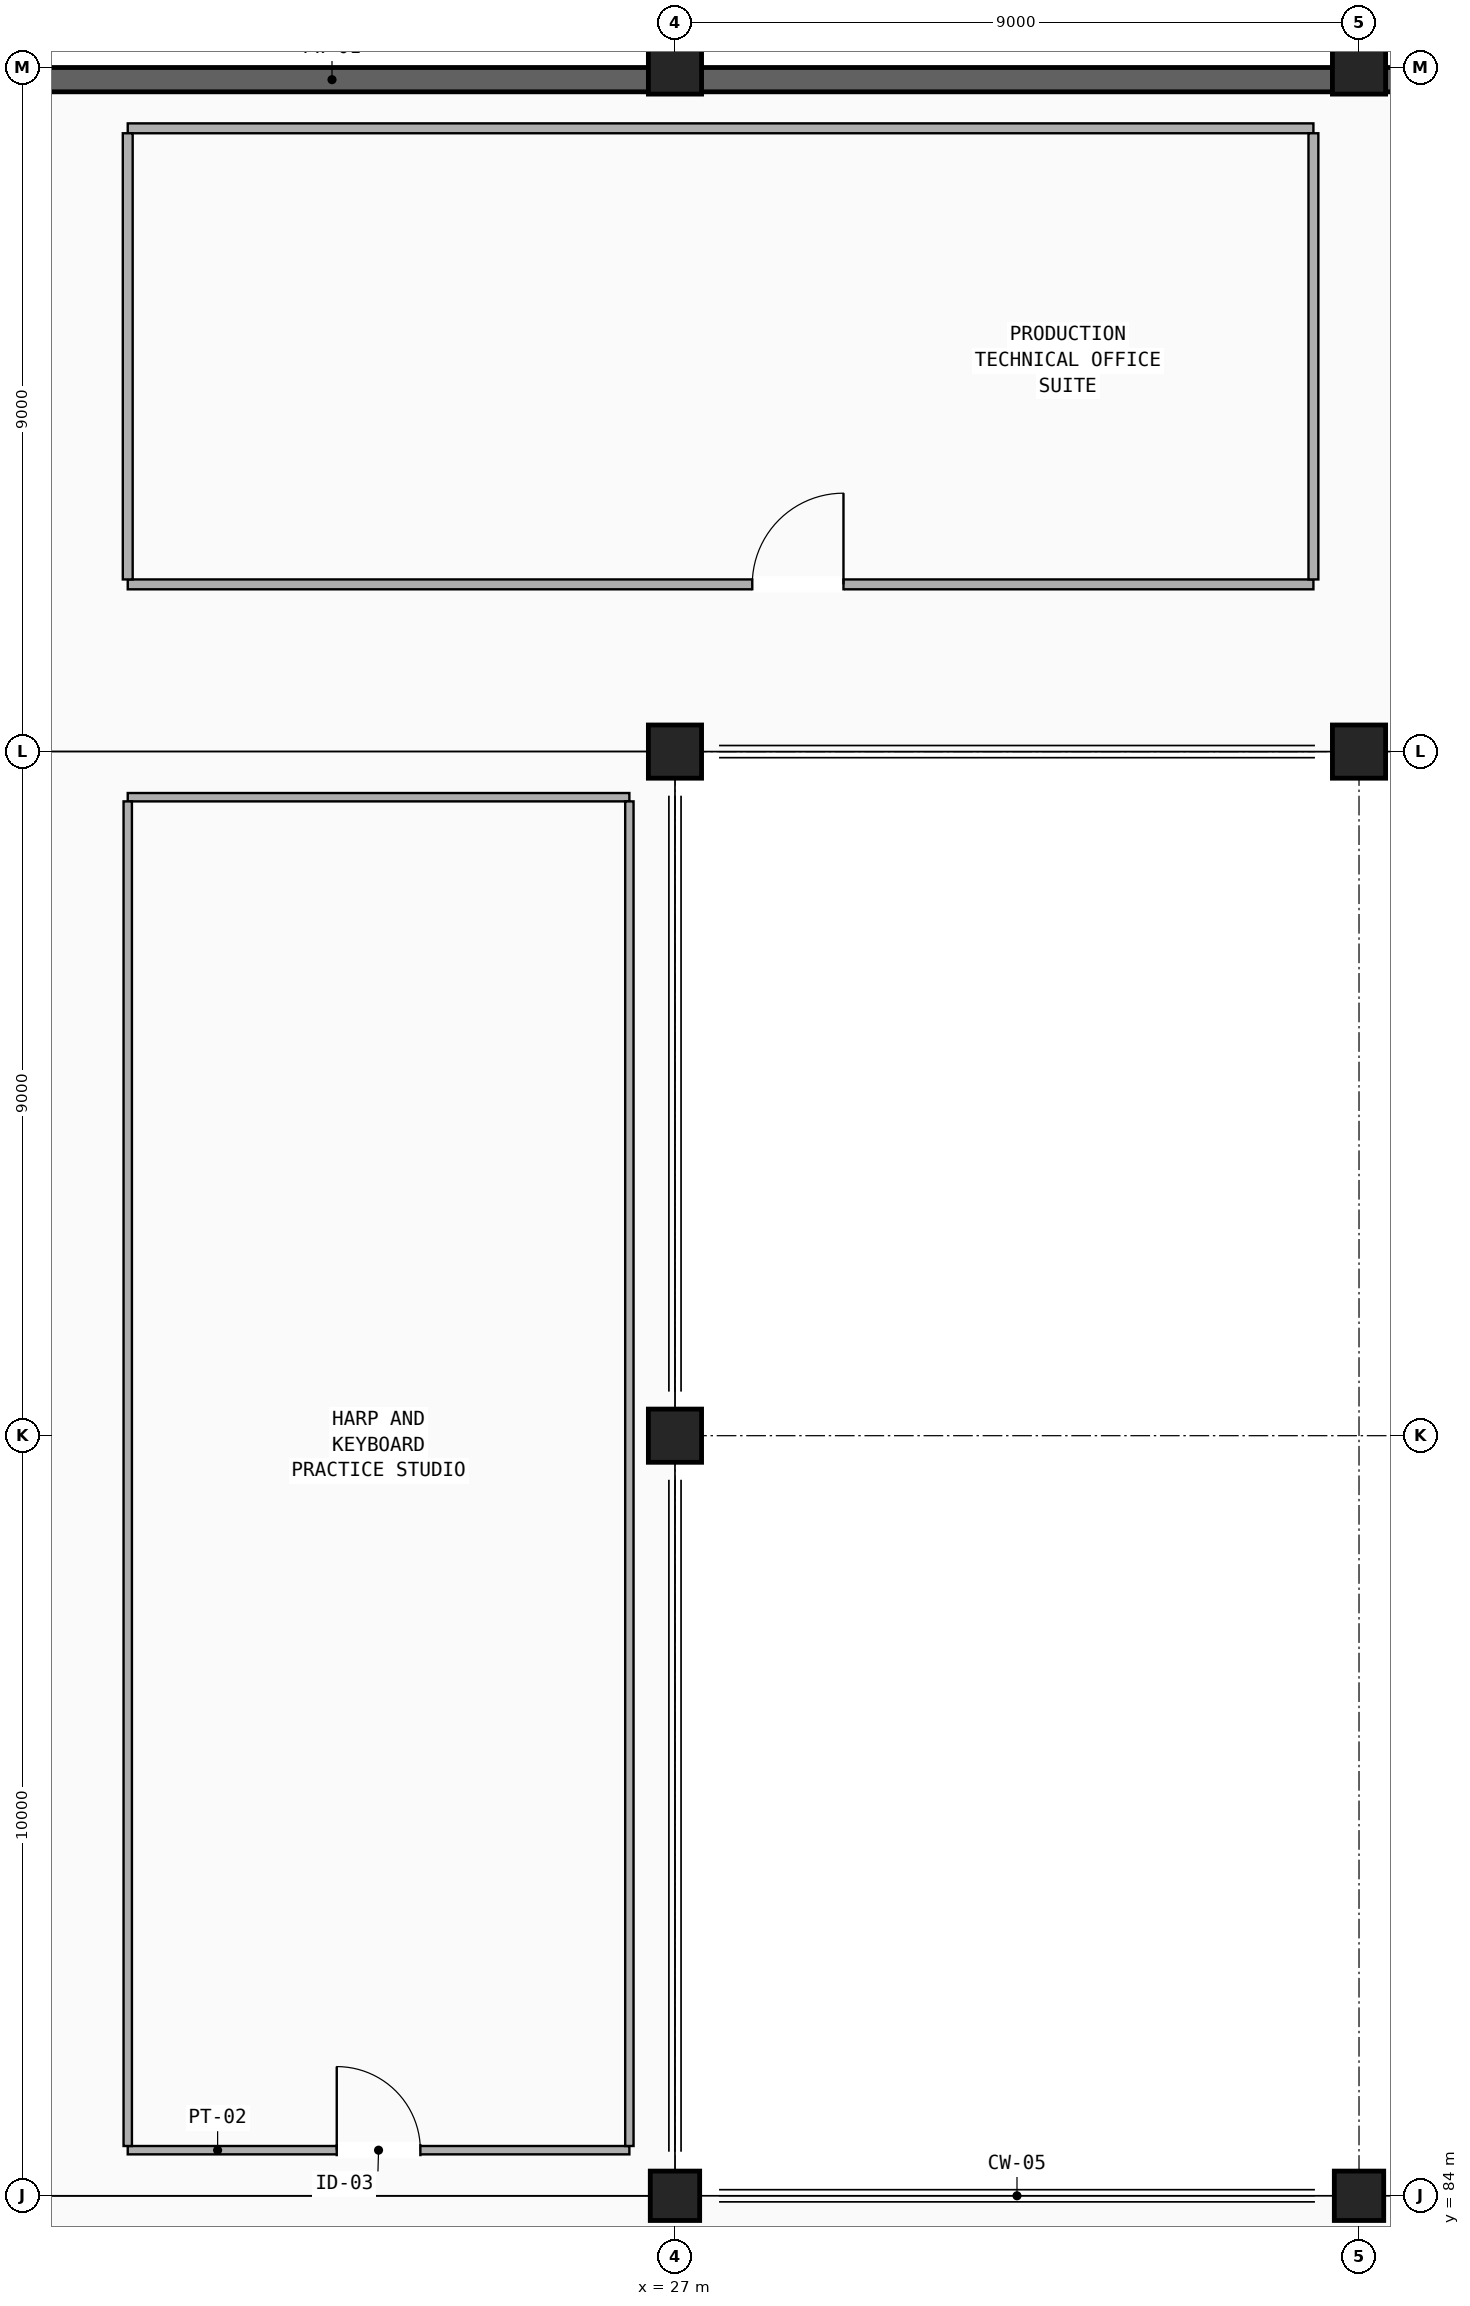
"""IFC4 building model, lengths in metres.
Left out: names, types, materials, properties, quantities, classifications, styles, units other than length and angle.
Written with IfcOpenShell. Run it as: python <this file> out.ifc"""

import sys

from ifc_helpers import new_model, si_unit, direction, frame, frame_2d, origin, origin_2d, place, context, subcontext, project, spatial, rectangle, extrude, element, fill, save


model = new_model("IFC4")
c1 = context("Model", 3, precision=1e-05, world=origin(), true_north=direction((0.0, 1.0)))
c2 = subcontext(c1, "Body", "Model", "MODEL_VIEW")
j1 = project(units=[si_unit("LENGTHUNIT", "METRE"), si_unit("PLANEANGLEUNIT", "RADIAN")], contexts=[c1])
p1 = place(None, origin())
s1 = spatial("IfcSite", under=j1, at=p1, CompositionType="ELEMENT")
p2 = place(p1, origin())
s2 = spatial("IfcBuilding", under=s1, at=p2, CompositionType="ELEMENT")
p3 = place(p2, frame((0.0, 0.0, 9.52)))
s3 = spatial("IfcBuildingStorey", under=s2, at=p3, CompositionType="ELEMENT", Elevation=9.52)
p4 = place(p3, frame((27.0, 84.0, 0.0), z_axis=(0.0, 0.0, 1.0), x_axis=(1.0, 0.0, 0.0)))
e1 = element("IfcColumn", 1, at=p4, inside=s3, PredefinedType="COLUMN", context=c2, shape_type="SweptSolid", body=[
    extrude(rectangle(XDim=0.65, YDim=0.65, at=origin_2d()), origin(), (0.0, 0.0, 1.0), 4.08),
])
for number, where, z_axis, x_axis in (
    (2, (27.0, 94.0, 0.0), (0.0, 0.0, 1.0), (1.0, 0.0, 0.0)),
    (3, (27.0, 103.0, 0.0), (0.0, 0.0, 1.0), (1.0, 0.0, 0.0)),
    (4, (27.0, 112.0, 0.0), (0.0, 0.0, 1.0), (1.0, 0.0, 0.0)),
):
    element("IfcColumn", number, at=place(p3, frame(where, z_axis=z_axis, x_axis=x_axis)), inside=s3, PredefinedType="COLUMN", context=c2, shape_type="SweptSolid", body=[
        extrude(rectangle(XDim=0.7, YDim=0.7, at=origin_2d()), origin(), (0.0, 0.0, 1.0), 4.08),
    ])
p5 = place(p3, frame((36.0, 84.0, 0.0), z_axis=(0.0, 0.0, 1.0), x_axis=(1.0, 0.0, 0.0)))
e5 = element("IfcColumn", 5, at=p5, inside=s3, PredefinedType="COLUMN", context=c2, shape_type="SweptSolid", body=[
    extrude(rectangle(XDim=0.65, YDim=0.65, at=origin_2d()), origin(), (0.0, 0.0, 1.0), 4.08),
])
for number, where, z_axis, x_axis in (
    (6, (36.0, 103.0, 0.0), (0.0, 0.0, 1.0), (1.0, 0.0, 0.0)),
    (7, (36.0, 112.0, 0.0), (0.0, 0.0, 1.0), (1.0, 0.0, 0.0)),
):
    element("IfcColumn", number, at=place(p3, frame(where, z_axis=z_axis, x_axis=x_axis)), inside=s3, PredefinedType="COLUMN", context=c2, shape_type="SweptSolid", body=[
        extrude(rectangle(XDim=0.7, YDim=0.7, at=origin_2d()), origin(), (0.0, 0.0, 1.0), 4.08),
    ])
p6 = place(p3, frame((18.35, 111.84, 0.0), z_axis=(0.0, 0.0, 1.0), x_axis=(1.0, 0.0, 0.0)))
e8 = element("IfcWall", 8, at=p6, inside=s3, PredefinedType="SHEAR", context=c2, shape_type="SweptSolid", body=[
    extrude(rectangle(XDim=44.95, YDim=0.32, at=frame_2d((22.475, 0.0))), origin(), (0.0, 0.0, 1.0), 4.08),
])
p7 = place(p3, frame((19.8, 84.6, 0.0), z_axis=(0.0, 0.0, 1.0), x_axis=(1.0, 0.0, 0.0)))
e9 = element("IfcWall", 9, at=p7, inside=s3, PredefinedType="PARTITIONING", context=c2, shape_type="SweptSolid", body=[
    extrude(rectangle(XDim=6.6, YDim=0.11, at=frame_2d((3.3, 0.0))), origin(), (0.0, 0.0, 1.0), 3.84),
])
p8 = place(p7, frame((2.75, 0.0, 0.0)))
e10 = element("IfcOpeningElement", 10, at=p8, cuts=e9, PredefinedType="OPENING", context=c2, shape_type="SweptSolid", body=[
    extrude(rectangle(XDim=1.1, YDim=2.2, at=frame_2d((0.55, 1.1))), frame((0.0, 0.065, 0.0), z_axis=(0.0, -1.0, 0.0), x_axis=(1.0, 0.0, 0.0)), (0.0, 0.0, 1.0), 0.13),
])
p9 = place(p3, frame((19.8, 102.4, 0.0), z_axis=(0.0, 0.0, 1.0), x_axis=(1.0, 0.0, 0.0)))
e11 = element("IfcWall", 11, at=p9, inside=s3, PredefinedType="PARTITIONING", context=c2, shape_type="SweptSolid", body=[
    extrude(rectangle(XDim=6.6, YDim=0.11, at=frame_2d((3.3, 0.0))), origin(), (0.0, 0.0, 1.0), 3.84),
])
for number, where, z_axis, x_axis in (
    (12, (19.8, 84.655, 0.0), (0.0, 0.0, 1.0), (0.0, 1.0, 0.0)),
    (13, (26.4, 84.655, 0.0), (0.0, 0.0, 1.0), (0.0, 1.0, 0.0)),
):
    element("IfcWall", number, at=place(p3, frame(where, z_axis=z_axis, x_axis=x_axis)), inside=s3, PredefinedType="PARTITIONING", context=c2, shape_type="SweptSolid", body=[
        extrude(rectangle(XDim=17.69, YDim=0.11, at=frame_2d((8.845, 0.0))), origin(), (0.0, 0.0, 1.0), 2.92),
    ])
p10 = place(p3, frame((19.8, 105.2, 0.0), z_axis=(0.0, 0.0, 1.0), x_axis=(1.0, 0.0, 0.0)))
e14 = element("IfcWall", 14, at=p10, inside=s3, PredefinedType="PARTITIONING", context=c2, shape_type="SweptSolid", body=[
    extrude(rectangle(XDim=15.6, YDim=0.13, at=frame_2d((7.8, 0.0))), origin(), (0.0, 0.0, 1.0), 3.14),
])
p11 = place(p10, frame((8.217, 0.0, 0.0)))
e15 = element("IfcOpeningElement", 15, at=p11, cuts=e14, PredefinedType="OPENING", context=c2, shape_type="SweptSolid", body=[
    extrude(rectangle(XDim=1.2, YDim=2.2, at=frame_2d((0.6, 1.1))), frame((0.0, 0.075, 0.0), z_axis=(0.0, -1.0, 0.0), x_axis=(1.0, 0.0, 0.0)), (0.0, 0.0, 1.0), 0.15),
])
p12 = place(p3, frame((19.8, 111.2, 0.0), z_axis=(0.0, 0.0, 1.0), x_axis=(1.0, 0.0, 0.0)))
e16 = element("IfcWall", 16, at=p12, inside=s3, PredefinedType="PARTITIONING", context=c2, shape_type="SweptSolid", body=[
    extrude(rectangle(XDim=15.6, YDim=0.13, at=frame_2d((7.8, 0.0))), origin(), (0.0, 0.0, 1.0), 3.14),
])
p13 = place(p3, frame((19.8, 105.265, 0.0), z_axis=(0.0, 0.0, 1.0), x_axis=(0.0, 1.0, 0.0)))
e17 = element("IfcWall", 17, at=p13, inside=s3, PredefinedType="PARTITIONING", context=c2, shape_type="SweptSolid", body=[
    extrude(rectangle(XDim=5.87, YDim=0.13, at=frame_2d((2.935, 0.0))), origin(), (0.0, 0.0, 1.0), 3.567),
])
p14 = place(p3, frame((35.4, 105.265, 0.0), z_axis=(0.0, 0.0, 1.0), x_axis=(0.0, 1.0, 0.0)))
e18 = element("IfcWall", 18, at=p14, inside=s3, PredefinedType="PARTITIONING", context=c2, shape_type="SweptSolid", body=[
    extrude(rectangle(XDim=5.87, YDim=0.13, at=frame_2d((2.935, 0.0))), origin(), (0.0, 0.0, 1.0), 3.36),
])
p15 = place(p8, origin())
e19 = element("IfcDoor", 19, at=p15, inside=s3, OperationType="SINGLE_SWING_LEFT", PredefinedType="DOOR", context=c2, shape_type="SweptSolid", body=[
    extrude(rectangle(XDim=1.1, YDim=2.2, at=frame_2d((0.55, 1.1))), frame((0.0, 0.025, 0.0), z_axis=(0.0, -1.0, 0.0), x_axis=(1.0, 0.0, 0.0)), (0.0, 0.0, 1.0), 0.05),
])
fill(e10, e19)
p16 = place(p11, origin())
e20 = element("IfcDoor", 20, at=p16, inside=s3, OperationType="SINGLE_SWING_RIGHT", PredefinedType="DOOR", context=c2, shape_type="SweptSolid", body=[
    extrude(rectangle(XDim=1.2, YDim=2.2, at=frame_2d((0.6, 1.1))), frame((0.0, 0.025, 0.0), z_axis=(0.0, -1.0, 0.0), x_axis=(1.0, 0.0, 0.0)), (0.0, 0.0, 1.0), 0.05),
])
fill(e15, e20)
save(model, sys.argv[1])
